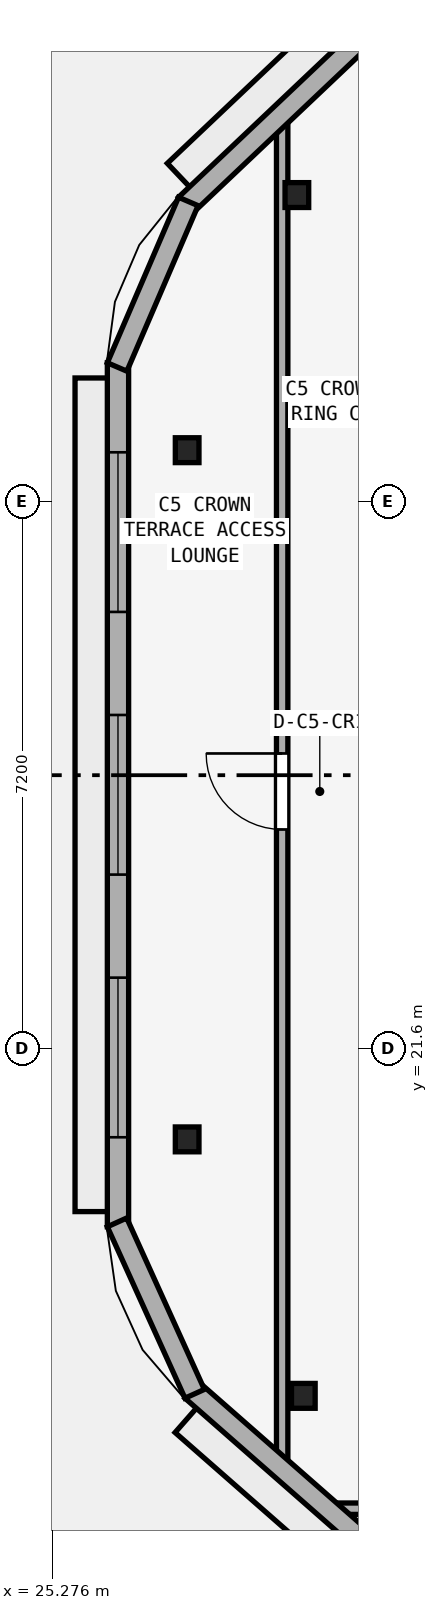
"""IFC4 building model, lengths in metres.
Left out: names, types, materials, properties, quantities, classifications, styles, units other than length and angle.
Written with IfcOpenShell. Run it as: python <this file> out.ifc"""

import sys

from ifc_helpers import new_model, si_unit, direction, frame, frame_2d, origin, origin_2d, place, context, subcontext, project, spatial, rectangle, i_section, extrude, element, fill, save


model = new_model("IFC4")
c1 = context("Model", 3, precision=1e-05, world=origin(), true_north=direction((0.0, 1.0)))
c2 = subcontext(c1, "Body", "Model", "MODEL_VIEW")
j1 = project(units=[si_unit("LENGTHUNIT", "METRE"), si_unit("PLANEANGLEUNIT", "RADIAN")], contexts=[c1])
p1 = place(None, origin())
s1 = spatial("IfcSite", under=j1, at=p1, CompositionType="ELEMENT")
p2 = place(p1, origin())
s2 = spatial("IfcBuilding", under=s1, at=p2, CompositionType="ELEMENT")
p3 = place(p2, frame((0.0, 0.0, 329.4)))
s3 = spatial("IfcBuildingStorey", under=s2, at=p3, CompositionType="ELEMENT", Elevation=329.4)
for number, where, z_axis, x_axis in (
    (1, (28.493, 32.832, 0.0), (0.0, 0.0, 1.0), (1.0, 0.0, 0.0)),
    (2, (27.05, 29.476, 0.0), (0.0, 0.0, 1.0), (1.0, 0.0, 0.0)),
    (3, (27.05, 20.409, 0.0), (0.0, 0.0, 1.0), (1.0, 0.0, 0.0)),
    (4, (28.578, 17.035, 0.0), (0.0, 0.0, 1.0), (1.0, 0.0, 0.0)),
):
    element("IfcColumn", number, at=place(p3, frame(where, z_axis=z_axis, x_axis=x_axis)), inside=s3, PredefinedType="COLUMN", context=c2, shape_type="SweptSolid", body=[
        extrude(i_section(OverallWidth=0.311, OverallDepth=0.327, WebThickness=0.016, FlangeThickness=0.025, at=origin_2d()), origin(), (0.0, 0.0, 1.0), 4.0),
    ])
p4 = place(p3, frame((28.3, 16.022, 0.0), z_axis=(0.0, 0.0, 1.0), x_axis=(0.0, 1.0, 0.0)))
e5 = element("IfcWall", 5, at=p4, inside=s3, PredefinedType="PARTITIONING", context=c2, shape_type="SweptSolid", body=[
    extrude(rectangle(XDim=17.933, YDim=0.15, at=frame_2d((8.967, 0.0))), origin(), (0.0, 0.0, 1.0), 3.176),
])
p5 = place(p4, frame((8.464, 0.0, 0.0)))
e6 = element("IfcOpeningElement", 6, at=p5, cuts=e5, PredefinedType="OPENING", context=c2, shape_type="SweptSolid", body=[
    extrude(rectangle(XDim=1.0, YDim=2.12, at=frame_2d((0.5, 1.06))), frame((0.0, 0.085, 0.0), z_axis=(0.0, -1.0, 0.0), x_axis=(1.0, 0.0, 0.0)), (0.0, 0.0, 1.0), 0.17),
])
p6 = place(p3, frame((28.818, 15.55, 0.0), z_axis=(0.0, 0.0, 1.0), x_axis=(1.0, 0.0, 0.0)))
e7 = element("IfcWall", 7, at=p6, inside=s3, PredefinedType="PARTITIONING", context=c2, shape_type="SweptSolid", body=[
    extrude(rectangle(XDim=23.98, YDim=0.15, at=frame_2d((11.99, 0.0))), origin(), (0.0, 0.0, 1.0), 3.72),
])
p7 = place(p6, frame((10.583, 0.0, 0.0)))
e8 = element("IfcOpeningElement", 8, at=p7, cuts=e7, PredefinedType="OPENING", context=c2, shape_type="SweptSolid", body=[
    extrude(rectangle(XDim=1.0, YDim=2.12, at=frame_2d((0.5, 1.06))), frame((0.0, 0.085, 0.0), z_axis=(0.0, -1.0, 0.0), x_axis=(1.0, 0.0, 0.0)), (0.0, 0.0, 1.0), 0.17),
])
p8 = place(p3, frame((33.654, 38.976, 0.0), z_axis=(0.0, 0.0, 1.0), x_axis=(-0.72588023988, -0.687821108539, 0.0)))
e9 = element("IfcWall", 9, at=p8, inside=s3, PredefinedType="STANDARD", context=c2, shape_type="SweptSolid", body=[
    extrude(rectangle(XDim=9.122, YDim=0.28, at=frame_2d((4.561, 0.0))), origin(), (0.0, 0.0, 1.0), 3.72),
])
p9 = place(p8, frame((1.054, 0.0, 0.9)))
e10 = element("IfcOpeningElement", 10, at=p9, cuts=e9, PredefinedType="OPENING", context=c2, shape_type="SweptSolid", body=[
    extrude(rectangle(XDim=1.6, YDim=1.45, at=frame_2d((0.8, 0.725))), frame((0.0, 0.15, 0.0), z_axis=(0.0, -1.0, 0.0), x_axis=(1.0, 0.0, 0.0)), (0.0, 0.0, 1.0), 0.3),
])
p10 = place(p8, frame((3.511, 0.0, 0.9)))
e11 = element("IfcOpeningElement", 11, at=p10, cuts=e9, PredefinedType="OPENING", context=c2, shape_type="SweptSolid", body=[
    extrude(rectangle(XDim=1.6, YDim=1.45, at=frame_2d((0.8, 0.725))), frame((0.0, 0.15, 0.0), z_axis=(0.0, -1.0, 0.0), x_axis=(1.0, 0.0, 0.0)), (0.0, 0.0, 1.0), 0.3),
])
p11 = place(p3, frame((26.14, 30.626, 0.0), z_axis=(0.0, 0.0, 1.0), x_axis=(0.0, -1.0, 0.0)))
e12 = element("IfcWall", 12, at=p11, inside=s3, PredefinedType="STANDARD", context=c2, shape_type="SweptSolid", body=[
    extrude(rectangle(XDim=11.367, YDim=0.28, at=frame_2d((5.684, 0.0))), origin(), (0.0, 0.0, 1.0), 3.72),
])
p12 = place(p11, frame((1.178, 0.0, 0.9)))
e13 = element("IfcOpeningElement", 13, at=p12, cuts=e12, PredefinedType="OPENING", context=c2, shape_type="SweptSolid", body=[
    extrude(rectangle(XDim=2.1, YDim=1.7, at=frame_2d((1.05, 0.85))), frame((0.0, 0.15, 0.0), z_axis=(0.0, -1.0, 0.0), x_axis=(1.0, 0.0, 0.0)), (0.0, 0.0, 1.0), 0.3),
])
p13 = place(p11, frame((4.634, 0.0, 0.9)))
e14 = element("IfcOpeningElement", 14, at=p13, cuts=e12, PredefinedType="OPENING", context=c2, shape_type="SweptSolid", body=[
    extrude(rectangle(XDim=2.1, YDim=1.7, at=frame_2d((1.05, 0.85))), frame((0.0, 0.15, 0.0), z_axis=(0.0, -1.0, 0.0), x_axis=(1.0, 0.0, 0.0)), (0.0, 0.0, 1.0), 0.3),
])
p14 = place(p11, frame((8.089, 0.0, 0.9)))
e15 = element("IfcOpeningElement", 15, at=p14, cuts=e12, PredefinedType="OPENING", context=c2, shape_type="SweptSolid", body=[
    extrude(rectangle(XDim=2.1, YDim=1.7, at=frame_2d((1.05, 0.85))), frame((0.0, 0.15, 0.0), z_axis=(0.0, -1.0, 0.0), x_axis=(1.0, 0.0, 0.0)), (0.0, 0.0, 1.0), 0.3),
])
p15 = place(p3, frame((27.114, 17.109, 0.0), z_axis=(0.0, 0.0, 1.0), x_axis=(0.751684867815, -0.659522448062, 0.0)))
e16 = element("IfcWall", 16, at=p15, inside=s3, PredefinedType="STANDARD", context=c2, shape_type="SweptSolid", body=[
    extrude(rectangle(XDim=8.723, YDim=0.28, at=frame_2d((4.362, 0.0))), origin(), (0.0, 0.0, 1.0), 3.72),
])
p16 = place(p15, frame((3.562, 0.0, 0.9)))
e17 = element("IfcOpeningElement", 17, at=p16, cuts=e16, PredefinedType="OPENING", context=c2, shape_type="SweptSolid", body=[
    extrude(rectangle(XDim=1.6, YDim=1.45, at=frame_2d((0.8, 0.725))), frame((0.0, 0.15, 0.0), z_axis=(0.0, -1.0, 0.0), x_axis=(1.0, 0.0, 0.0)), (0.0, 0.0, 1.0), 0.3),
])
p17 = place(p15, frame((6.136, 0.0, 0.9)))
e18 = element("IfcOpeningElement", 18, at=p17, cuts=e16, PredefinedType="OPENING", context=c2, shape_type="SweptSolid", body=[
    extrude(rectangle(XDim=1.6, YDim=1.45, at=frame_2d((0.8, 0.725))), frame((0.0, 0.15, 0.0), z_axis=(0.0, -1.0, 0.0), x_axis=(1.0, 0.0, 0.0)), (0.0, 0.0, 1.0), 0.3),
])
p18 = place(p3, frame((27.065, 32.748, 0.0), z_axis=(0.0, 0.0, 1.0), x_axis=(-0.39509989751, -0.918638161077, 0.0)))
e19 = element("IfcWall", 19, at=p18, inside=s3, PredefinedType="STANDARD", context=c2, shape_type="SweptSolid", body=[
    extrude(rectangle(XDim=2.37, YDim=0.28, at=frame_2d((1.185, 0.0))), origin(), (0.0, 0.0, 1.0), 3.72),
])
p19 = place(p3, frame((26.127, 19.317, 0.0), z_axis=(0.0, 0.0, 1.0), x_axis=(0.412606370101, -0.910909426536, 0.0)))
e20 = element("IfcWall", 20, at=p19, inside=s3, PredefinedType="STANDARD", context=c2, shape_type="SweptSolid", body=[
    extrude(rectangle(XDim=2.476, YDim=0.28, at=frame_2d((1.238, 0.0))), origin(), (0.0, 0.0, 1.0), 3.72),
])
p20 = place(p5, origin())
e21 = element("IfcDoor", 21, at=p20, inside=s3, OperationType="SINGLE_SWING_RIGHT", PredefinedType="DOOR", context=c2, shape_type="SweptSolid", body=[
    extrude(rectangle(XDim=1.0, YDim=2.12, at=frame_2d((0.5, 1.06))), frame((0.0, 0.025, 0.0), z_axis=(0.0, -1.0, 0.0), x_axis=(1.0, 0.0, 0.0)), (0.0, 0.0, 1.0), 0.05),
])
fill(e6, e21)
p21 = place(p12, origin())
e22 = element("IfcWindow", 22, at=p21, inside=s3, PartitioningType="SINGLE_PANEL", PredefinedType="WINDOW", context=c2, shape_type="SweptSolid", body=[
    extrude(rectangle(XDim=2.1, YDim=1.7, at=frame_2d((1.05, 0.85))), frame((0.0, 0.03, 0.0), z_axis=(0.0, -1.0, 0.0), x_axis=(1.0, 0.0, 0.0)), (0.0, 0.0, 1.0), 0.06),
])
fill(e13, e22)
p22 = place(p13, origin())
e23 = element("IfcWindow", 23, at=p22, inside=s3, PartitioningType="SINGLE_PANEL", PredefinedType="WINDOW", context=c2, shape_type="SweptSolid", body=[
    extrude(rectangle(XDim=2.1, YDim=1.7, at=frame_2d((1.05, 0.85))), frame((0.0, 0.03, 0.0), z_axis=(0.0, -1.0, 0.0), x_axis=(1.0, 0.0, 0.0)), (0.0, 0.0, 1.0), 0.06),
])
fill(e14, e23)
p23 = place(p14, origin())
e24 = element("IfcWindow", 24, at=p23, inside=s3, PartitioningType="SINGLE_PANEL", PredefinedType="WINDOW", context=c2, shape_type="SweptSolid", body=[
    extrude(rectangle(XDim=2.1, YDim=1.7, at=frame_2d((1.05, 0.85))), frame((0.0, 0.03, 0.0), z_axis=(0.0, -1.0, 0.0), x_axis=(1.0, 0.0, 0.0)), (0.0, 0.0, 1.0), 0.06),
])
fill(e15, e24)
save(model, sys.argv[1])
